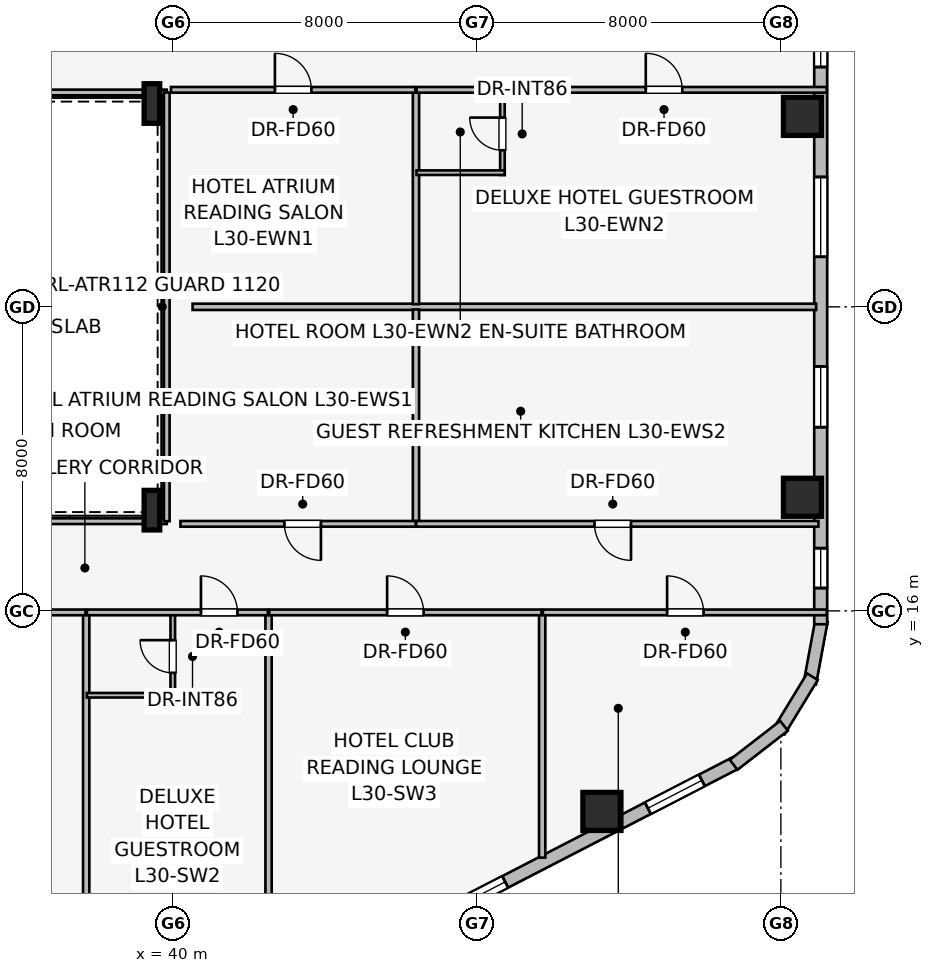
"""IFC4 building model, lengths in metres.
Left out: names, types, materials, properties, quantities, classifications, styles, units other than length and angle.
Written with IfcOpenShell. Run it as: python <this file> out.ifc"""

import sys

from ifc_helpers import new_model, si_unit, direction, frame, frame_2d, origin, origin_2d, place, context, subcontext, project, spatial, rectangle, i_section, extrude, element, fill, save


model = new_model("IFC4")
c1 = context("Model", 3, precision=1e-05, world=origin(), true_north=direction((0.0, 1.0)))
c2 = subcontext(c1, "Body", "Model", "MODEL_VIEW")
j1 = project(units=[si_unit("LENGTHUNIT", "METRE"), si_unit("PLANEANGLEUNIT", "RADIAN")], contexts=[c1])
p1 = place(None, origin())
s1 = spatial("IfcSite", under=j1, at=p1, CompositionType="ELEMENT")
p2 = place(p1, origin())
s2 = spatial("IfcBuilding", under=s1, at=p2, CompositionType="ELEMENT")
p3 = place(p2, frame((0.0, 0.0, 115.35)))
s3 = spatial("IfcBuildingStorey", under=s2, at=p3, CompositionType="ELEMENT", Elevation=115.35)
for number, where, z_axis, x_axis in (
    (1, (51.291, 10.723, 0.0), (0.0, 0.0, 1.0), (1.0, 0.0, 0.0)),
    (2, (56.568, 18.989, 0.0), (0.0, 0.0, 1.0), (1.0, 0.0, 0.0)),
    (3, (56.568, 29.011, 0.0), (0.0, 0.0, 1.0), (1.0, 0.0, 0.0)),
):
    element("IfcColumn", number, at=place(p3, frame(where, z_axis=z_axis, x_axis=x_axis)), inside=s3, PredefinedType="COLUMN", context=c2, shape_type="SweptSolid", body=[
        extrude(rectangle(XDim=1.0, YDim=1.0, at=origin_2d()), origin(), (0.0, 0.0, 1.0), 3.45),
    ])
for number, where, z_axis, x_axis in (
    (4, (39.45, 18.65, 0.0), (0.0, 0.0, 1.0), (1.0, 0.0, 0.0)),
    (5, (39.45, 29.35, 0.0), (0.0, 0.0, 1.0), (1.0, 0.0, 0.0)),
):
    element("IfcColumn", number, at=place(p3, frame(where, z_axis=z_axis, x_axis=x_axis)), inside=s3, PredefinedType="COLUMN", context=c2, shape_type="SweptSolid", body=[
        extrude(i_section(OverallWidth=0.41, OverallDepth=1.041, WebThickness=0.031, FlangeThickness=0.056, at=origin_2d()), origin(), (0.0, 0.0, 1.0), 3.45),
    ])
p4 = place(p3, frame((54.831, 12.01, 0.0), z_axis=(0.0, 0.0, 1.0), x_axis=(-0.888613612362, -0.458656568606, 0.0)))
e6 = element("IfcWall", 6, at=p4, inside=s3, PredefinedType="STANDARD", context=c2, shape_type="SweptSolid", body=[
    extrude(rectangle(XDim=18.681, YDim=0.34, at=frame_2d((9.34, 0.0))), origin(), (0.0, 0.0, 1.0), 3.16),
])
p5 = place(p4, frame((1.023, 0.0, 0.75)))
e7 = element("IfcOpeningElement", 7, at=p5, cuts=e6, PredefinedType="OPENING", context=c2, shape_type="SweptSolid", body=[
    extrude(rectangle(XDim=1.6, YDim=1.55, at=frame_2d((0.8, 0.775))), frame((0.0, 0.18, 0.0), z_axis=(0.0, -1.0, 0.0), x_axis=(1.0, 0.0, 0.0)), (0.0, 0.0, 1.0), 0.36),
])
p6 = place(p4, frame((6.848, 0.0, 0.75)))
e8 = element("IfcOpeningElement", 8, at=p6, cuts=e6, PredefinedType="OPENING", context=c2, shape_type="SweptSolid", body=[
    extrude(rectangle(XDim=2.1, YDim=1.5, at=frame_2d((1.05, 0.75))), frame((0.0, 0.18, 0.0), z_axis=(0.0, -1.0, 0.0), x_axis=(1.0, 0.0, 0.0)), (0.0, 0.0, 1.0), 0.36),
])
p7 = place(p4, frame((10.536, 0.0, 0.75)))
e9 = element("IfcOpeningElement", 9, at=p7, cuts=e6, PredefinedType="OPENING", context=c2, shape_type="SweptSolid", body=[
    extrude(rectangle(XDim=2.1, YDim=1.5, at=frame_2d((1.05, 0.75))), frame((0.0, 0.18, 0.0), z_axis=(0.0, -1.0, 0.0), x_axis=(1.0, 0.0, 0.0)), (0.0, 0.0, 1.0), 0.36),
])
p8 = place(p4, frame((16.058, 0.0, 0.75)))
e10 = element("IfcOpeningElement", 10, at=p8, cuts=e6, PredefinedType="OPENING", context=c2, shape_type="SweptSolid", body=[
    extrude(rectangle(XDim=1.6, YDim=1.55, at=frame_2d((0.8, 0.775))), frame((0.0, 0.18, 0.0), z_axis=(0.0, -1.0, 0.0), x_axis=(1.0, 0.0, 0.0)), (0.0, 0.0, 1.0), 0.36),
])
p9 = place(p3, frame((57.068, 15.742, 0.0), z_axis=(0.0, 0.0, 1.0), x_axis=(-0.181984991895, -0.983301308209, 0.0)))
e11 = element("IfcWall", 11, at=p9, inside=s3, PredefinedType="STANDARD", context=c2, shape_type="SweptSolid", body=[
    extrude(rectangle(XDim=1.677, YDim=0.33, at=frame_2d((0.838, 0.0))), origin(), (0.0, 0.0, 1.0), 3.16),
])
p10 = place(p3, frame((56.83, 14.268, 0.0), z_axis=(0.0, 0.0, 1.0), x_axis=(-0.520519429557, -0.853849824883, 0.0)))
e12 = element("IfcWall", 12, at=p10, inside=s3, PredefinedType="STANDARD", context=c2, shape_type="SweptSolid", body=[
    extrude(rectangle(XDim=1.677, YDim=0.33, at=frame_2d((0.839, 0.0))), origin(), (0.0, 0.0, 1.0), 3.16),
])
p11 = place(p3, frame((56.082, 12.976, 0.0), z_axis=(0.0, 0.0, 1.0), x_axis=(-0.790621329885, -0.612305408053, 0.0)))
e13 = element("IfcWall", 13, at=p11, inside=s3, PredefinedType="STANDARD", context=c2, shape_type="SweptSolid", body=[
    extrude(rectangle(XDim=1.676, YDim=0.33, at=frame_2d((0.838, 0.0))), origin(), (0.0, 0.0, 1.0), 3.16),
])
p12 = place(p3, frame((57.048, 32.352, 0.0), z_axis=(0.0, 0.0, 1.0), x_axis=(0.0, -1.0, 0.0)))
e14 = element("IfcWall", 14, at=p12, inside=s3, PredefinedType="STANDARD", context=c2, shape_type="SweptSolid", body=[
    extrude(rectangle(XDim=16.704, YDim=0.34, at=frame_2d((8.352, 0.0))), origin(), (0.0, 0.0, 1.0), 3.16),
])
p13 = place(p12, frame((0.992, 0.0, 0.75)))
e15 = element("IfcOpeningElement", 15, at=p13, cuts=e14, PredefinedType="OPENING", context=c2, shape_type="SweptSolid", body=[
    extrude(rectangle(XDim=1.05, YDim=1.4, at=frame_2d((0.525, 0.7))), frame((0.0, 0.18, 0.0), z_axis=(0.0, -1.0, 0.0), x_axis=(1.0, 0.0, 0.0)), (0.0, 0.0, 1.0), 0.36),
])
p14 = place(p12, frame((4.935, 0.0, 0.75)))
e16 = element("IfcOpeningElement", 16, at=p14, cuts=e14, PredefinedType="OPENING", context=c2, shape_type="SweptSolid", body=[
    extrude(rectangle(XDim=2.1, YDim=1.5, at=frame_2d((1.05, 0.75))), frame((0.0, 0.18, 0.0), z_axis=(0.0, -1.0, 0.0), x_axis=(1.0, 0.0, 0.0)), (0.0, 0.0, 1.0), 0.36),
])
p15 = place(p12, frame((9.919, 0.0, 0.75)))
e17 = element("IfcOpeningElement", 17, at=p15, cuts=e14, PredefinedType="OPENING", context=c2, shape_type="SweptSolid", body=[
    extrude(rectangle(XDim=1.6, YDim=1.55, at=frame_2d((0.8, 0.775))), frame((0.0, 0.18, 0.0), z_axis=(0.0, -1.0, 0.0), x_axis=(1.0, 0.0, 0.0)), (0.0, 0.0, 1.0), 0.36),
])
p16 = place(p12, frame((14.702, 0.0, 0.75)))
e18 = element("IfcOpeningElement", 18, at=p16, cuts=e14, PredefinedType="OPENING", context=c2, shape_type="SweptSolid", body=[
    extrude(rectangle(XDim=1.05, YDim=1.4, at=frame_2d((0.525, 0.7))), frame((0.0, 0.18, 0.0), z_axis=(0.0, -1.0, 0.0), x_axis=(1.0, 0.0, 0.0)), (0.0, 0.0, 1.0), 0.36),
])
p17 = place(p3, frame((27.55, 18.36, 0.0), z_axis=(0.0, 0.0, 1.0), x_axis=(1.0, 0.0, 0.0)))
e19 = element("IfcWall", 19, at=p17, inside=s3, PredefinedType="PARTITIONING", context=c2, shape_type="SweptSolid", body=[
    extrude(rectangle(XDim=12.29, YDim=0.15, at=frame_2d((6.145, 0.0))), origin(), (0.0, 0.0, 1.0), 2.301),
])
p18 = place(p3, frame((39.84, 29.64, 0.0), z_axis=(0.0, 0.0, 1.0), x_axis=(-1.0, 0.0, 0.0)))
e20 = element("IfcWall", 20, at=p18, inside=s3, PredefinedType="PARTITIONING", context=c2, shape_type="SweptSolid", body=[
    extrude(rectangle(XDim=12.2, YDim=0.15, at=frame_2d((6.1, 0.0))), origin(), (0.0, 0.0, 1.0), 2.301),
])
p19 = place(p3, frame((39.84, 18.36, 0.0), z_axis=(0.0, 0.0, 1.0), x_axis=(0.0, 1.0, 0.0)))
e21 = element("IfcWall", 21, at=p19, inside=s3, PredefinedType="PARTITIONING", context=c2, shape_type="SweptSolid", body=[
    extrude(rectangle(XDim=11.28, YDim=0.15, at=frame_2d((5.64, 0.0))), origin(), (0.0, 0.0, 1.0), 3.16),
])
p20 = place(p3, frame((40.52, 24.0, 0.0), z_axis=(0.0, 0.0, 1.0), x_axis=(1.0, 0.0, 0.0)))
e22 = element("IfcWall", 22, at=p20, inside=s3, PredefinedType="PARTITIONING", context=c2, shape_type="SweptSolid", body=[
    extrude(rectangle(XDim=16.408, YDim=0.165, at=frame_2d((8.204, 0.0))), origin(), (0.0, 0.0, 1.0), 3.16),
])
p21 = place(p3, frame((46.398, 24.07, 0.0), z_axis=(0.0, 0.0, 1.0), x_axis=(0.0, 1.0, 0.0)))
e23 = element("IfcWall", 23, at=p21, inside=s3, PredefinedType="PARTITIONING", context=c2, shape_type="SweptSolid", body=[
    extrude(rectangle(XDim=5.64, YDim=0.165, at=frame_2d((2.82, 0.0))), origin(), (0.0, 0.0, 1.0), 3.16),
])
p22 = place(p3, frame((39.95, 29.71, 0.0), z_axis=(0.0, 0.0, 1.0), x_axis=(1.0, 0.0, 0.0)))
e24 = element("IfcWall", 24, at=p22, inside=s3, PredefinedType="PARTITIONING", context=c2, shape_type="SweptSolid", body=[
    extrude(rectangle(XDim=6.433, YDim=0.15, at=frame_2d((3.217, 0.0))), origin(), (0.0, 0.0, 1.0), 3.16),
])
p23 = place(p22, frame((2.736, 0.0, 0.0)))
e25 = element("IfcOpeningElement", 25, at=p23, cuts=e24, PredefinedType="OPENING", context=c2, shape_type="SweptSolid", body=[
    extrude(rectangle(XDim=0.96, YDim=2.0, at=frame_2d((0.48, 1.0))), frame((0.0, 0.085, 0.0), z_axis=(0.0, -1.0, 0.0), x_axis=(1.0, 0.0, 0.0)), (0.0, 0.0, 1.0), 0.17),
])
p24 = place(p3, frame((48.673, 27.47, 0.0), z_axis=(0.0, 0.0, 1.0), x_axis=(0.0, 1.0, 0.0)))
e26 = element("IfcWall", 26, at=p24, inside=s3, PredefinedType="PARTITIONING", context=c2, shape_type="SweptSolid", body=[
    extrude(rectangle(XDim=2.24, YDim=0.12, at=frame_2d((1.12, 0.0))), origin(), (0.0, 0.0, 1.0), 3.16),
])
p25 = place(p24, frame((0.65, 0.0, 0.0)))
e27 = element("IfcOpeningElement", 27, at=p25, cuts=e26, PredefinedType="OPENING", context=c2, shape_type="SweptSolid", body=[
    extrude(rectangle(XDim=0.86, YDim=2.0, at=frame_2d((0.43, 1.0))), frame((0.0, 0.07, 0.0), z_axis=(0.0, -1.0, 0.0), x_axis=(1.0, 0.0, 0.0)), (0.0, 0.0, 1.0), 0.14),
])
p26 = place(p3, frame((46.413, 27.53, 0.0), z_axis=(0.0, 0.0, 1.0), x_axis=(1.0, 0.0, 0.0)))
e28 = element("IfcWall", 28, at=p26, inside=s3, PredefinedType="PARTITIONING", context=c2, shape_type="SweptSolid", body=[
    extrude(rectangle(XDim=2.32, YDim=0.12, at=frame_2d((1.16, 0.0))), origin(), (0.0, 0.0, 1.0), 3.16),
])
p27 = place(p3, frame((46.413, 29.71, 0.0), z_axis=(0.0, 0.0, 1.0), x_axis=(1.0, 0.0, 0.0)))
e29 = element("IfcWall", 29, at=p27, inside=s3, PredefinedType="PARTITIONING", context=c2, shape_type="SweptSolid", body=[
    extrude(rectangle(XDim=10.795, YDim=0.15, at=frame_2d((5.397, 0.0))), origin(), (0.0, 0.0, 1.0), 3.16),
])
p28 = place(p27, frame((6.032, 0.0, 0.0)))
e30 = element("IfcOpeningElement", 30, at=p28, cuts=e29, PredefinedType="OPENING", context=c2, shape_type="SweptSolid", body=[
    extrude(rectangle(XDim=0.96, YDim=2.0, at=frame_2d((0.48, 1.0))), frame((0.0, 0.085, 0.0), z_axis=(0.0, -1.0, 0.0), x_axis=(1.0, 0.0, 0.0)), (0.0, 0.0, 1.0), 0.17),
])
p29 = place(p3, frame((46.398, 18.29, 0.0), z_axis=(0.0, 0.0, 1.0), x_axis=(0.0, 1.0, 0.0)))
e31 = element("IfcWall", 31, at=p29, inside=s3, PredefinedType="PARTITIONING", context=c2, shape_type="SweptSolid", body=[
    extrude(rectangle(XDim=5.64, YDim=0.165, at=frame_2d((2.82, 0.0))), origin(), (0.0, 0.0, 1.0), 3.16),
])
p30 = place(p3, frame((46.393, 18.29, 0.0), z_axis=(0.0, 0.0, 1.0), x_axis=(-1.0, 0.0, 0.0)))
e32 = element("IfcWall", 32, at=p30, inside=s3, PredefinedType="PARTITIONING", context=c2, shape_type="SweptSolid", body=[
    extrude(rectangle(XDim=6.193, YDim=0.15, at=frame_2d((3.097, 0.0))), origin(), (0.0, 0.0, 1.0), 3.16),
])
p31 = place(p30, frame((2.496, 0.0, 0.0)))
e33 = element("IfcOpeningElement", 33, at=p31, cuts=e32, PredefinedType="OPENING", context=c2, shape_type="SweptSolid", body=[
    extrude(rectangle(XDim=0.96, YDim=2.0, at=frame_2d((0.48, 1.0))), frame((0.0, 0.085, 0.0), z_axis=(0.0, -1.0, 0.0), x_axis=(1.0, 0.0, 0.0)), (0.0, 0.0, 1.0), 0.17),
])
p32 = place(p3, frame((56.988, 18.29, 0.0), z_axis=(0.0, 0.0, 1.0), x_axis=(-1.0, 0.0, 0.0)))
e34 = element("IfcWall", 34, at=p32, inside=s3, PredefinedType="PARTITIONING", context=c2, shape_type="SweptSolid", body=[
    extrude(rectangle(XDim=10.585, YDim=0.15, at=frame_2d((5.292, 0.0))), origin(), (0.0, 0.0, 1.0), 3.16),
])
p33 = place(p32, frame((4.932, 0.0, 0.0)))
e35 = element("IfcOpeningElement", 35, at=p33, cuts=e34, PredefinedType="OPENING", context=c2, shape_type="SweptSolid", body=[
    extrude(rectangle(XDim=0.96, YDim=2.0, at=frame_2d((0.48, 1.0))), frame((0.0, 0.085, 0.0), z_axis=(0.0, -1.0, 0.0), x_axis=(1.0, 0.0, 0.0)), (0.0, 0.0, 1.0), 0.17),
])
p34 = place(p3, frame((37.72, 3.403, 0.0), z_axis=(0.0, 0.0, 1.0), x_axis=(0.0, 1.0, 0.0)))
e36 = element("IfcWall", 36, at=p34, inside=s3, PredefinedType="PARTITIONING", context=c2, shape_type="SweptSolid", body=[
    extrude(rectangle(XDim=12.527, YDim=0.165, at=frame_2d((6.263, 0.0))), origin(), (0.0, 0.0, 1.0), 3.16),
])
p35 = place(p3, frame((42.519, 5.79, 0.0), z_axis=(0.0, 0.0, 1.0), x_axis=(0.0, 1.0, 0.0)))
e37 = element("IfcWall", 37, at=p35, inside=s3, PredefinedType="PARTITIONING", context=c2, shape_type="SweptSolid", body=[
    extrude(rectangle(XDim=10.14, YDim=0.165, at=frame_2d((5.07, 0.0))), origin(), (0.0, 0.0, 1.0), 3.16),
])
p36 = place(p3, frame((49.719, 9.507, 0.0), z_axis=(0.0, 0.0, 1.0), x_axis=(0.0, 1.0, 0.0)))
e38 = element("IfcWall", 38, at=p36, inside=s3, PredefinedType="PARTITIONING", context=c2, shape_type="SweptSolid", body=[
    extrude(rectangle(XDim=6.423, YDim=0.165, at=frame_2d((3.211, 0.0))), origin(), (0.0, 0.0, 1.0), 3.16),
])
p37 = place(p3, frame((32.85, 15.96, 0.0), z_axis=(0.0, 0.0, 1.0), x_axis=(1.0, 0.0, 0.0)))
e39 = element("IfcWall", 39, at=p37, inside=s3, PredefinedType="PARTITIONING", context=c2, shape_type="SweptSolid", body=[
    extrude(rectangle(XDim=4.852, YDim=0.15, at=frame_2d((2.426, 0.0))), origin(), (0.0, 0.0, 1.0), 3.16),
])
p38 = place(p37, frame((1.946, 0.0, 0.0)))
e40 = element("IfcOpeningElement", 40, at=p38, cuts=e39, PredefinedType="OPENING", context=c2, shape_type="SweptSolid", body=[
    extrude(rectangle(XDim=0.96, YDim=2.0, at=frame_2d((0.48, 1.0))), frame((0.0, 0.085, 0.0), z_axis=(0.0, -1.0, 0.0), x_axis=(1.0, 0.0, 0.0)), (0.0, 0.0, 1.0), 0.17),
])
p39 = place(p3, frame((39.998, 13.72, 0.0), z_axis=(0.0, 0.0, 1.0), x_axis=(0.0, 1.0, 0.0)))
e41 = element("IfcWall", 41, at=p39, inside=s3, PredefinedType="PARTITIONING", context=c2, shape_type="SweptSolid", body=[
    extrude(rectangle(XDim=2.24, YDim=0.12, at=frame_2d((1.12, 0.0))), origin(), (0.0, 0.0, 1.0), 2.39),
])
p40 = place(p39, frame((0.65, 0.0, 0.0)))
e42 = element("IfcOpeningElement", 42, at=p40, cuts=e41, PredefinedType="OPENING", context=c2, shape_type="SweptSolid", body=[
    extrude(rectangle(XDim=0.86, YDim=2.0, at=frame_2d((0.43, 1.0))), frame((0.0, 0.07, 0.0), z_axis=(0.0, -1.0, 0.0), x_axis=(1.0, 0.0, 0.0)), (0.0, 0.0, 1.0), 0.14),
])
p41 = place(p3, frame((37.738, 13.78, 0.0), z_axis=(0.0, 0.0, 1.0), x_axis=(1.0, 0.0, 0.0)))
e43 = element("IfcWall", 43, at=p41, inside=s3, PredefinedType="PARTITIONING", context=c2, shape_type="SweptSolid", body=[
    extrude(rectangle(XDim=2.32, YDim=0.12, at=frame_2d((1.16, 0.0))), origin(), (0.0, 0.0, 1.0), 3.16),
])
p42 = place(p3, frame((37.738, 15.96, 0.0), z_axis=(0.0, 0.0, 1.0), x_axis=(1.0, 0.0, 0.0)))
e44 = element("IfcWall", 44, at=p42, inside=s3, PredefinedType="PARTITIONING", context=c2, shape_type="SweptSolid", body=[
    extrude(rectangle(XDim=4.763, YDim=0.15, at=frame_2d((2.381, 0.0))), origin(), (0.0, 0.0, 1.0), 3.16),
])
p43 = place(p42, frame((3.002, 0.0, 0.0)))
e45 = element("IfcOpeningElement", 45, at=p43, cuts=e44, PredefinedType="OPENING", context=c2, shape_type="SweptSolid", body=[
    extrude(rectangle(XDim=0.96, YDim=2.0, at=frame_2d((0.48, 1.0))), frame((0.0, 0.085, 0.0), z_axis=(0.0, -1.0, 0.0), x_axis=(1.0, 0.0, 0.0)), (0.0, 0.0, 1.0), 0.17),
])
p44 = place(p3, frame((42.537, 15.96, 0.0), z_axis=(0.0, 0.0, 1.0), x_axis=(1.0, 0.0, 0.0)))
e46 = element("IfcWall", 46, at=p44, inside=s3, PredefinedType="PARTITIONING", context=c2, shape_type="SweptSolid", body=[
    extrude(rectangle(XDim=7.164, YDim=0.15, at=frame_2d((3.582, 0.0))), origin(), (0.0, 0.0, 1.0), 3.16),
])
p45 = place(p44, frame((3.102, 0.0, 0.0)))
e47 = element("IfcOpeningElement", 47, at=p45, cuts=e46, PredefinedType="OPENING", context=c2, shape_type="SweptSolid", body=[
    extrude(rectangle(XDim=0.96, YDim=2.0, at=frame_2d((0.48, 1.0))), frame((0.0, 0.085, 0.0), z_axis=(0.0, -1.0, 0.0), x_axis=(1.0, 0.0, 0.0)), (0.0, 0.0, 1.0), 0.17),
])
p46 = place(p3, frame((49.737, 15.96, 0.0), z_axis=(0.0, 0.0, 1.0), x_axis=(1.0, 0.0, 0.0)))
e48 = element("IfcWall", 48, at=p46, inside=s3, PredefinedType="PARTITIONING", context=c2, shape_type="SweptSolid", body=[
    extrude(rectangle(XDim=7.471, YDim=0.15, at=frame_2d((3.735, 0.0))), origin(), (0.0, 0.0, 1.0), 3.16),
])
p47 = place(p46, frame((3.269, 0.0, 0.0)))
e49 = element("IfcOpeningElement", 49, at=p47, cuts=e48, PredefinedType="OPENING", context=c2, shape_type="SweptSolid", body=[
    extrude(rectangle(XDim=0.96, YDim=2.0, at=frame_2d((0.48, 1.0))), frame((0.0, 0.085, 0.0), z_axis=(0.0, -1.0, 0.0), x_axis=(1.0, 0.0, 0.0)), (0.0, 0.0, 1.0), 0.17),
])
p48 = place(p5, origin())
e50 = element("IfcWindow", 50, at=p48, inside=s3, PartitioningType="SINGLE_PANEL", PredefinedType="WINDOW", context=c2, shape_type="SweptSolid", body=[
    extrude(rectangle(XDim=1.6, YDim=1.55, at=frame_2d((0.8, 0.775))), frame((0.0, 0.03, 0.0), z_axis=(0.0, -1.0, 0.0), x_axis=(1.0, 0.0, 0.0)), (0.0, 0.0, 1.0), 0.06),
])
fill(e7, e50)
p49 = place(p6, origin())
e51 = element("IfcWindow", 51, at=p49, inside=s3, PartitioningType="SINGLE_PANEL", PredefinedType="WINDOW", context=c2, shape_type="SweptSolid", body=[
    extrude(rectangle(XDim=2.1, YDim=1.5, at=frame_2d((1.05, 0.75))), frame((0.0, 0.03, 0.0), z_axis=(0.0, -1.0, 0.0), x_axis=(1.0, 0.0, 0.0)), (0.0, 0.0, 1.0), 0.06),
])
fill(e8, e51)
p50 = place(p13, origin())
e52 = element("IfcWindow", 52, at=p50, inside=s3, PartitioningType="SINGLE_PANEL", PredefinedType="WINDOW", context=c2, shape_type="SweptSolid", body=[
    extrude(rectangle(XDim=1.05, YDim=1.4, at=frame_2d((0.525, 0.7))), frame((0.0, 0.03, 0.0), z_axis=(0.0, -1.0, 0.0), x_axis=(1.0, 0.0, 0.0)), (0.0, 0.0, 1.0), 0.06),
])
fill(e15, e52)
p51 = place(p14, origin())
e53 = element("IfcWindow", 53, at=p51, inside=s3, PartitioningType="SINGLE_PANEL", PredefinedType="WINDOW", context=c2, shape_type="SweptSolid", body=[
    extrude(rectangle(XDim=2.1, YDim=1.5, at=frame_2d((1.05, 0.75))), frame((0.0, 0.03, 0.0), z_axis=(0.0, -1.0, 0.0), x_axis=(1.0, 0.0, 0.0)), (0.0, 0.0, 1.0), 0.06),
])
fill(e16, e53)
p52 = place(p15, origin())
e54 = element("IfcWindow", 54, at=p52, inside=s3, PartitioningType="SINGLE_PANEL", PredefinedType="WINDOW", context=c2, shape_type="SweptSolid", body=[
    extrude(rectangle(XDim=1.6, YDim=1.55, at=frame_2d((0.8, 0.775))), frame((0.0, 0.03, 0.0), z_axis=(0.0, -1.0, 0.0), x_axis=(1.0, 0.0, 0.0)), (0.0, 0.0, 1.0), 0.06),
])
fill(e17, e54)
p53 = place(p16, origin())
e55 = element("IfcWindow", 55, at=p53, inside=s3, PartitioningType="SINGLE_PANEL", PredefinedType="WINDOW", context=c2, shape_type="SweptSolid", body=[
    extrude(rectangle(XDim=1.05, YDim=1.4, at=frame_2d((0.525, 0.7))), frame((0.0, 0.03, 0.0), z_axis=(0.0, -1.0, 0.0), x_axis=(1.0, 0.0, 0.0)), (0.0, 0.0, 1.0), 0.06),
])
fill(e18, e55)
p54 = place(p23, origin())
e56 = element("IfcDoor", 56, at=p54, inside=s3, OperationType="SINGLE_SWING_LEFT", PredefinedType="DOOR", context=c2, shape_type="SweptSolid", body=[
    extrude(rectangle(XDim=0.96, YDim=2.0, at=frame_2d((0.48, 1.0))), frame((0.0, 0.025, 0.0), z_axis=(0.0, -1.0, 0.0), x_axis=(1.0, 0.0, 0.0)), (0.0, 0.0, 1.0), 0.05),
])
fill(e25, e56)
p55 = place(p25, origin())
e57 = element("IfcDoor", 57, at=p55, inside=s3, OperationType="SINGLE_SWING_RIGHT", PredefinedType="DOOR", context=c2, shape_type="SweptSolid", body=[
    extrude(rectangle(XDim=0.86, YDim=2.0, at=frame_2d((0.43, 1.0))), frame((0.0, 0.025, 0.0), z_axis=(0.0, -1.0, 0.0), x_axis=(1.0, 0.0, 0.0)), (0.0, 0.0, 1.0), 0.05),
])
fill(e27, e57)
p56 = place(p28, origin())
e58 = element("IfcDoor", 58, at=p56, inside=s3, OperationType="SINGLE_SWING_LEFT", PredefinedType="DOOR", context=c2, shape_type="SweptSolid", body=[
    extrude(rectangle(XDim=0.96, YDim=2.0, at=frame_2d((0.48, 1.0))), frame((0.0, 0.025, 0.0), z_axis=(0.0, -1.0, 0.0), x_axis=(1.0, 0.0, 0.0)), (0.0, 0.0, 1.0), 0.05),
])
fill(e30, e58)
p57 = place(p31, origin())
e59 = element("IfcDoor", 59, at=p57, inside=s3, OperationType="SINGLE_SWING_LEFT", PredefinedType="DOOR", context=c2, shape_type="SweptSolid", body=[
    extrude(rectangle(XDim=0.96, YDim=2.0, at=frame_2d((0.48, 1.0))), frame((0.0, 0.025, 0.0), z_axis=(0.0, -1.0, 0.0), x_axis=(1.0, 0.0, 0.0)), (0.0, 0.0, 1.0), 0.05),
])
fill(e33, e59)
p58 = place(p33, origin())
e60 = element("IfcDoor", 60, at=p58, inside=s3, OperationType="SINGLE_SWING_LEFT", PredefinedType="DOOR", context=c2, shape_type="SweptSolid", body=[
    extrude(rectangle(XDim=0.96, YDim=2.0, at=frame_2d((0.48, 1.0))), frame((0.0, 0.025, 0.0), z_axis=(0.0, -1.0, 0.0), x_axis=(1.0, 0.0, 0.0)), (0.0, 0.0, 1.0), 0.05),
])
fill(e35, e60)
p59 = place(p40, origin())
e61 = element("IfcDoor", 61, at=p59, inside=s3, OperationType="SINGLE_SWING_RIGHT", PredefinedType="DOOR", context=c2, shape_type="SweptSolid", body=[
    extrude(rectangle(XDim=0.86, YDim=2.0, at=frame_2d((0.43, 1.0))), frame((0.0, 0.025, 0.0), z_axis=(0.0, -1.0, 0.0), x_axis=(1.0, 0.0, 0.0)), (0.0, 0.0, 1.0), 0.05),
])
fill(e42, e61)
p60 = place(p43, origin())
e62 = element("IfcDoor", 62, at=p60, inside=s3, OperationType="SINGLE_SWING_LEFT", PredefinedType="DOOR", context=c2, shape_type="SweptSolid", body=[
    extrude(rectangle(XDim=0.96, YDim=2.0, at=frame_2d((0.48, 1.0))), frame((0.0, 0.025, 0.0), z_axis=(0.0, -1.0, 0.0), x_axis=(1.0, 0.0, 0.0)), (0.0, 0.0, 1.0), 0.05),
])
fill(e45, e62)
p61 = place(p45, origin())
e63 = element("IfcDoor", 63, at=p61, inside=s3, OperationType="SINGLE_SWING_LEFT", PredefinedType="DOOR", context=c2, shape_type="SweptSolid", body=[
    extrude(rectangle(XDim=0.96, YDim=2.0, at=frame_2d((0.48, 1.0))), frame((0.0, 0.025, 0.0), z_axis=(0.0, -1.0, 0.0), x_axis=(1.0, 0.0, 0.0)), (0.0, 0.0, 1.0), 0.05),
])
fill(e47, e63)
p62 = place(p47, origin())
e64 = element("IfcDoor", 64, at=p62, inside=s3, OperationType="SINGLE_SWING_LEFT", PredefinedType="DOOR", context=c2, shape_type="SweptSolid", body=[
    extrude(rectangle(XDim=0.96, YDim=2.0, at=frame_2d((0.48, 1.0))), frame((0.0, 0.025, 0.0), z_axis=(0.0, -1.0, 0.0), x_axis=(1.0, 0.0, 0.0)), (0.0, 0.0, 1.0), 0.05),
])
fill(e49, e64)
save(model, sys.argv[1])
